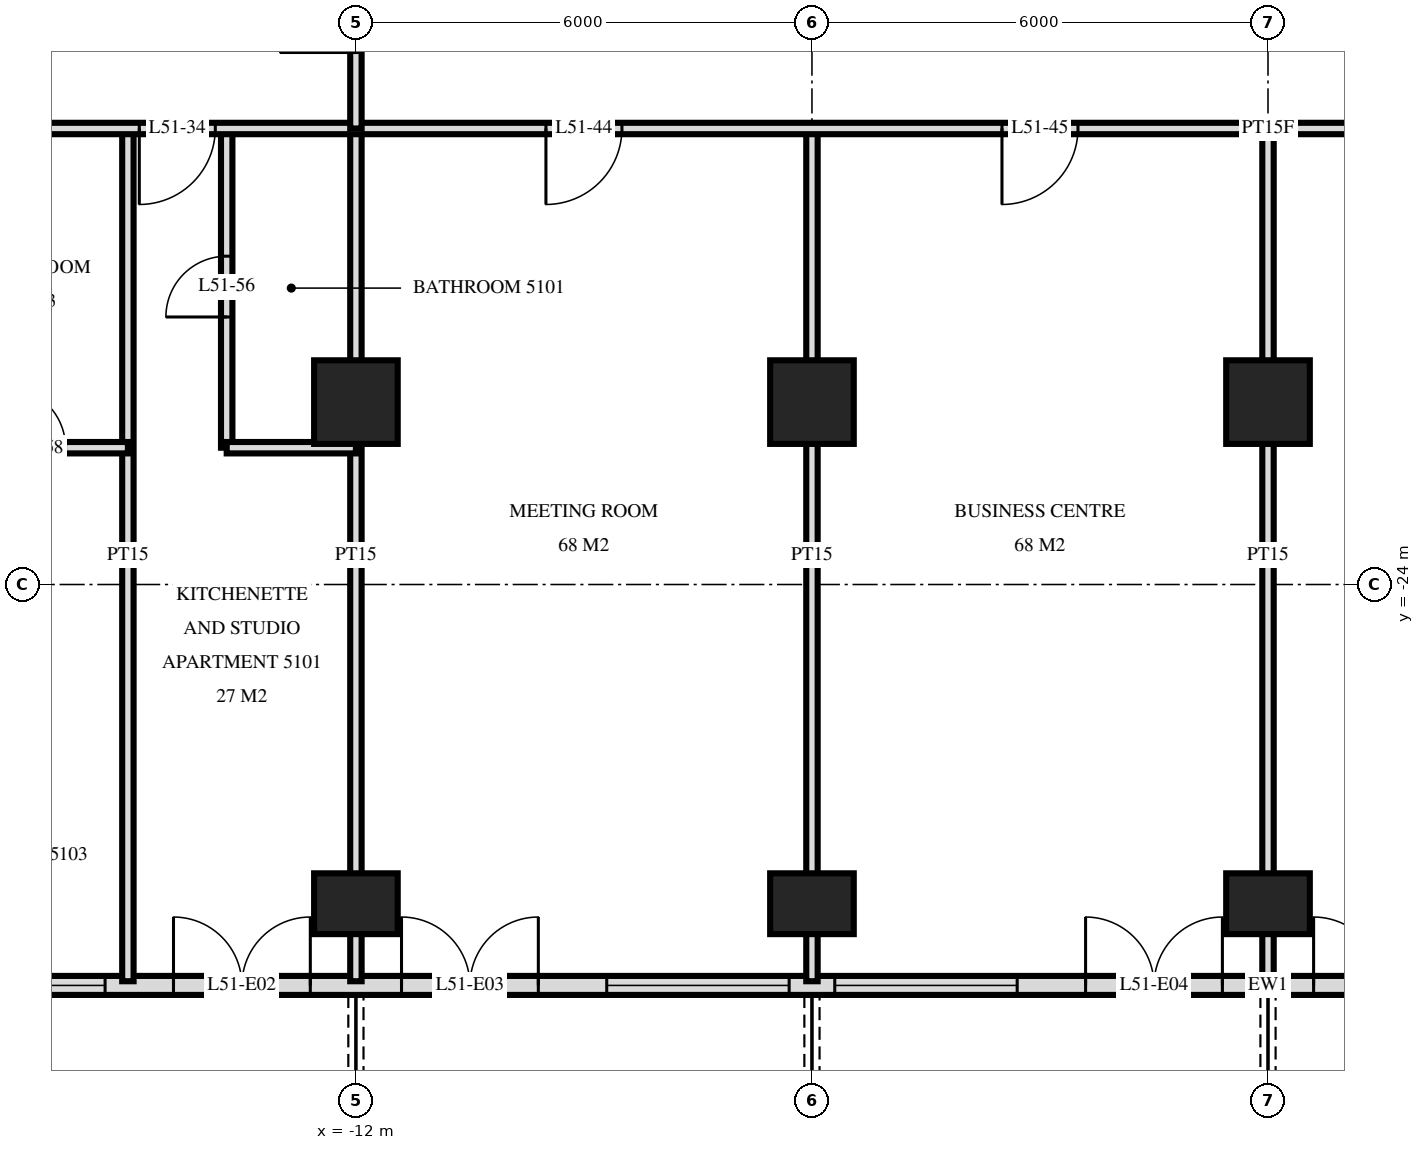
"""IFC4 building model, lengths in metres.
Left out: names, types, materials, properties, quantities, classifications, styles, units other than length and angle.
Written with IfcOpenShell. Run it as: python <this file> out.ifc"""

import sys

from ifc_helpers import new_model, si_unit, direction, frame, frame_2d, origin, origin_2d, place, context, subcontext, project, spatial, rectangle, extrude, element, fill, save


model = new_model("IFC4")
c1 = context("Model", 3, precision=1e-05, world=origin(), true_north=direction((0.0, 1.0)))
c2 = subcontext(c1, "Body", "Model", "MODEL_VIEW")
j1 = project(units=[si_unit("LENGTHUNIT", "METRE"), si_unit("PLANEANGLEUNIT", "RADIAN")], contexts=[c1])
p1 = place(None, origin())
s1 = spatial("IfcSite", under=j1, at=p1, CompositionType="ELEMENT")
p2 = place(p1, origin())
s2 = spatial("IfcBuilding", under=s1, at=p2, CompositionType="ELEMENT")
p3 = place(p2, frame((0.0, 0.0, 197.6)))
s3 = spatial("IfcBuildingStorey", under=s2, at=p3, CompositionType="ELEMENT", Elevation=197.6)
p4 = place(p3, frame((-12.0, -28.2, 0.0), z_axis=(0.0, 0.0, 1.0), x_axis=(1.0, 0.0, 0.0)))
e1 = element("IfcColumn", 1, at=p4, inside=s3, PredefinedType="COLUMN", context=c2, shape_type="SweptSolid", body=[
    extrude(rectangle(XDim=1.1, YDim=0.8, at=origin_2d()), origin(), (0.0, 0.0, 1.0), 3.5),
])
p5 = place(p3, frame((-12.0, -21.6, 0.0), z_axis=(0.0, 0.0, 1.0), x_axis=(1.0, 0.0, 0.0)))
e2 = element("IfcColumn", 2, at=p5, inside=s3, PredefinedType="COLUMN", context=c2, shape_type="SweptSolid", body=[
    extrude(rectangle(XDim=1.1, YDim=1.1, at=origin_2d()), origin(), (0.0, 0.0, 1.0), 3.5),
])
p6 = place(p3, frame((-6.0, -28.2, 0.0), z_axis=(0.0, 0.0, 1.0), x_axis=(1.0, 0.0, 0.0)))
e3 = element("IfcColumn", 3, at=p6, inside=s3, PredefinedType="COLUMN", context=c2, shape_type="SweptSolid", body=[
    extrude(rectangle(XDim=1.1, YDim=0.8, at=origin_2d()), origin(), (0.0, 0.0, 1.0), 3.5),
])
p7 = place(p3, frame((-6.0, -21.6, 0.0), z_axis=(0.0, 0.0, 1.0), x_axis=(1.0, 0.0, 0.0)))
e4 = element("IfcColumn", 4, at=p7, inside=s3, PredefinedType="COLUMN", context=c2, shape_type="SweptSolid", body=[
    extrude(rectangle(XDim=1.1, YDim=1.1, at=origin_2d()), origin(), (0.0, 0.0, 1.0), 3.5),
])
p8 = place(p3, frame((0.0, -28.2, 0.0), z_axis=(0.0, 0.0, 1.0), x_axis=(1.0, 0.0, 0.0)))
e5 = element("IfcColumn", 5, at=p8, inside=s3, PredefinedType="COLUMN", context=c2, shape_type="SweptSolid", body=[
    extrude(rectangle(XDim=1.1, YDim=0.8, at=origin_2d()), origin(), (0.0, 0.0, 1.0), 3.5),
])
p9 = place(p3, frame((0.0, -21.6, 0.0), z_axis=(0.0, 0.0, 1.0), x_axis=(1.0, 0.0, 0.0)))
e6 = element("IfcColumn", 6, at=p9, inside=s3, PredefinedType="COLUMN", context=c2, shape_type="SweptSolid", body=[
    extrude(rectangle(XDim=1.1, YDim=1.1, at=origin_2d()), origin(), (0.0, 0.0, 1.0), 3.5),
])
p10 = place(p3, frame((-22.475, -29.275, 0.0), z_axis=(0.0, 0.0, 1.0), x_axis=(1.0, 0.0, 0.0)))
e7 = element("IfcWall", 7, at=p10, inside=s3, PredefinedType="SOLIDWALL", context=c2, shape_type="SweptSolid", body=[
    extrude(rectangle(XDim=44.951, YDim=0.25, at=frame_2d((22.475, 0.0))), origin(), (0.0, 0.0, 1.0), 3.22),
])
p11 = place(p10, frame((0.575, 0.0, 0.0)))
e8 = element("IfcOpeningElement", 8, at=p11, cuts=e7, PredefinedType="OPENING", context=c2, shape_type="SweptSolid", body=[
    extrude(rectangle(XDim=1.8, YDim=2.4, at=frame_2d((0.9, 1.2))), frame((0.0, 0.135, 0.0), z_axis=(0.0, -1.0, 0.0), x_axis=(1.0, 0.0, 0.0)), (0.0, 0.0, 1.0), 0.27),
])
p12 = place(p10, frame((4.775, 0.0, 0.9)))
e9 = element("IfcOpeningElement", 9, at=p12, cuts=e7, PredefinedType="OPENING", context=c2, shape_type="SweptSolid", body=[
    extrude(rectangle(XDim=2.4, YDim=1.5, at=frame_2d((1.2, 0.75))), frame((0.0, 0.135, 0.0), z_axis=(0.0, -1.0, 0.0), x_axis=(1.0, 0.0, 0.0)), (0.0, 0.0, 1.0), 0.27),
])
p13 = place(p10, frame((8.075, 0.0, 0.0)))
e10 = element("IfcOpeningElement", 10, at=p13, cuts=e7, PredefinedType="OPENING", context=c2, shape_type="SweptSolid", body=[
    extrude(rectangle(XDim=1.8, YDim=2.4, at=frame_2d((0.9, 1.2))), frame((0.0, 0.135, 0.0), z_axis=(0.0, -1.0, 0.0), x_axis=(1.0, 0.0, 0.0)), (0.0, 0.0, 1.0), 0.27),
])
p14 = place(p10, frame((11.075, 0.0, 0.0)))
e11 = element("IfcOpeningElement", 11, at=p14, cuts=e7, PredefinedType="OPENING", context=c2, shape_type="SweptSolid", body=[
    extrude(rectangle(XDim=1.8, YDim=2.4, at=frame_2d((0.9, 1.2))), frame((0.0, 0.135, 0.0), z_axis=(0.0, -1.0, 0.0), x_axis=(1.0, 0.0, 0.0)), (0.0, 0.0, 1.0), 0.27),
])
p15 = place(p10, frame((13.775, 0.0, 0.9)))
e12 = element("IfcOpeningElement", 12, at=p15, cuts=e7, PredefinedType="OPENING", context=c2, shape_type="SweptSolid", body=[
    extrude(rectangle(XDim=2.4, YDim=1.5, at=frame_2d((1.2, 0.75))), frame((0.0, 0.135, 0.0), z_axis=(0.0, -1.0, 0.0), x_axis=(1.0, 0.0, 0.0)), (0.0, 0.0, 1.0), 0.27),
])
p16 = place(p10, frame((16.775, 0.0, 0.9)))
e13 = element("IfcOpeningElement", 13, at=p16, cuts=e7, PredefinedType="OPENING", context=c2, shape_type="SweptSolid", body=[
    extrude(rectangle(XDim=2.4, YDim=1.5, at=frame_2d((1.2, 0.75))), frame((0.0, 0.135, 0.0), z_axis=(0.0, -1.0, 0.0), x_axis=(1.0, 0.0, 0.0)), (0.0, 0.0, 1.0), 0.27),
])
p17 = place(p10, frame((20.075, 0.0, 0.0)))
e14 = element("IfcOpeningElement", 14, at=p17, cuts=e7, PredefinedType="OPENING", context=c2, shape_type="SweptSolid", body=[
    extrude(rectangle(XDim=1.8, YDim=2.4, at=frame_2d((0.9, 1.2))), frame((0.0, 0.135, 0.0), z_axis=(0.0, -1.0, 0.0), x_axis=(1.0, 0.0, 0.0)), (0.0, 0.0, 1.0), 0.27),
])
p18 = place(p10, frame((23.075, 0.0, 0.0)))
e15 = element("IfcOpeningElement", 15, at=p18, cuts=e7, PredefinedType="OPENING", context=c2, shape_type="SweptSolid", body=[
    extrude(rectangle(XDim=1.8, YDim=2.4, at=frame_2d((0.9, 1.2))), frame((0.0, 0.135, 0.0), z_axis=(0.0, -1.0, 0.0), x_axis=(1.0, 0.0, 0.0)), (0.0, 0.0, 1.0), 0.27),
])
p19 = place(p10, frame((25.775, 0.0, 0.9)))
e16 = element("IfcOpeningElement", 16, at=p19, cuts=e7, PredefinedType="OPENING", context=c2, shape_type="SweptSolid", body=[
    extrude(rectangle(XDim=2.4, YDim=1.5, at=frame_2d((1.2, 0.75))), frame((0.0, 0.135, 0.0), z_axis=(0.0, -1.0, 0.0), x_axis=(1.0, 0.0, 0.0)), (0.0, 0.0, 1.0), 0.27),
])
p20 = place(p10, frame((29.075, 0.0, 0.0)))
e17 = element("IfcOpeningElement", 17, at=p20, cuts=e7, PredefinedType="OPENING", context=c2, shape_type="SweptSolid", body=[
    extrude(rectangle(XDim=1.8, YDim=2.4, at=frame_2d((0.9, 1.2))), frame((0.0, 0.135, 0.0), z_axis=(0.0, -1.0, 0.0), x_axis=(1.0, 0.0, 0.0)), (0.0, 0.0, 1.0), 0.27),
])
p21 = place(p10, frame((31.775, 0.0, 0.9)))
e18 = element("IfcOpeningElement", 18, at=p21, cuts=e7, PredefinedType="OPENING", context=c2, shape_type="SweptSolid", body=[
    extrude(rectangle(XDim=2.4, YDim=1.5, at=frame_2d((1.2, 0.75))), frame((0.0, 0.135, 0.0), z_axis=(0.0, -1.0, 0.0), x_axis=(1.0, 0.0, 0.0)), (0.0, 0.0, 1.0), 0.27),
])
p22 = place(p10, frame((35.075, 0.0, 0.0)))
e19 = element("IfcOpeningElement", 19, at=p22, cuts=e7, PredefinedType="OPENING", context=c2, shape_type="SweptSolid", body=[
    extrude(rectangle(XDim=1.8, YDim=2.4, at=frame_2d((0.9, 1.2))), frame((0.0, 0.135, 0.0), z_axis=(0.0, -1.0, 0.0), x_axis=(1.0, 0.0, 0.0)), (0.0, 0.0, 1.0), 0.27),
])
p23 = place(p10, frame((37.775, 0.0, 0.9)))
e20 = element("IfcOpeningElement", 20, at=p23, cuts=e7, PredefinedType="OPENING", context=c2, shape_type="SweptSolid", body=[
    extrude(rectangle(XDim=2.4, YDim=1.5, at=frame_2d((1.2, 0.75))), frame((0.0, 0.135, 0.0), z_axis=(0.0, -1.0, 0.0), x_axis=(1.0, 0.0, 0.0)), (0.0, 0.0, 1.0), 0.27),
])
p24 = place(p10, frame((41.075, 0.0, 0.0)))
e21 = element("IfcOpeningElement", 21, at=p24, cuts=e7, PredefinedType="OPENING", context=c2, shape_type="SweptSolid", body=[
    extrude(rectangle(XDim=1.8, YDim=2.4, at=frame_2d((0.9, 1.2))), frame((0.0, 0.135, 0.0), z_axis=(0.0, -1.0, 0.0), x_axis=(1.0, 0.0, 0.0)), (0.0, 0.0, 1.0), 0.27),
])
for number, where, z_axis, x_axis in (
    (22, (0.0, -29.22, 0.0), (0.0, 0.0, 1.0), (0.0, 1.0, 0.0)),
    (23, (-6.0, -29.22, 0.0), (0.0, 0.0, 1.0), (0.0, 1.0, 0.0)),
):
    element("IfcWall", number, at=place(p3, frame(where, z_axis=z_axis, x_axis=x_axis)), inside=s3, PredefinedType="PARTITIONING", context=c2, shape_type="SweptSolid", body=[
        extrude(rectangle(XDim=11.22, YDim=0.15, at=frame_2d((5.61, 0.0))), origin(), (0.0, 0.0, 1.0), 3.22),
    ])
p25 = place(p3, frame((-12.0, -18.0, 0.0), z_axis=(0.0, 0.0, 1.0), x_axis=(0.0, 1.0, 0.0)))
e24 = element("IfcWall", 24, at=p25, inside=s3, PredefinedType="PARTITIONING", context=c2, shape_type="SweptSolid", body=[
    extrude(rectangle(XDim=2.95, YDim=0.15, at=frame_2d((1.475, 0.0))), origin(), (0.0, 0.0, 1.0), 3.22),
])
p26 = place(p25, frame((1.0, 0.0, 0.0)))
e25 = element("IfcOpeningElement", 25, at=p26, cuts=e24, PredefinedType="OPENING", context=c2, shape_type="SweptSolid", body=[
    extrude(rectangle(XDim=1.0, YDim=2.1, at=frame_2d((0.5, 1.05))), frame((0.0, 0.085, 0.0), z_axis=(0.0, -1.0, 0.0), x_axis=(1.0, 0.0, 0.0)), (0.0, 0.0, 1.0), 0.17),
])
p27 = place(p3, frame((-12.0, -29.22, 0.0), z_axis=(0.0, 0.0, 1.0), x_axis=(0.0, 1.0, 0.0)))
e26 = element("IfcWall", 26, at=p27, inside=s3, PredefinedType="PARTITIONING", context=c2, shape_type="SweptSolid", body=[
    extrude(rectangle(XDim=11.22, YDim=0.15, at=frame_2d((5.61, 0.0))), origin(), (0.0, 0.0, 1.0), 3.22),
])
p28 = place(p3, frame((-13.7, -22.2, 0.0), z_axis=(0.0, 0.0, 1.0), x_axis=(0.0, 1.0, 0.0)))
e27 = element("IfcWall", 27, at=p28, inside=s3, PredefinedType="PARTITIONING", context=c2, shape_type="SweptSolid", body=[
    extrude(rectangle(XDim=4.2, YDim=0.15, at=frame_2d((2.1, 0.0))), origin(), (0.0, 0.0, 1.0), 3.22),
])
p29 = place(p28, frame((1.72, 0.0, 0.0)))
e28 = element("IfcOpeningElement", 28, at=p29, cuts=e27, PredefinedType="OPENING", context=c2, shape_type="SweptSolid", body=[
    extrude(rectangle(XDim=0.8, YDim=2.1, at=frame_2d((0.4, 1.05))), frame((0.0, 0.085, 0.0), z_axis=(0.0, -1.0, 0.0), x_axis=(1.0, 0.0, 0.0)), (0.0, 0.0, 1.0), 0.17),
])
p30 = place(p3, frame((-15.0, -29.22, 0.0), z_axis=(0.0, 0.0, 1.0), x_axis=(0.0, 1.0, 0.0)))
e29 = element("IfcWall", 29, at=p30, inside=s3, PredefinedType="PARTITIONING", context=c2, shape_type="SweptSolid", body=[
    extrude(rectangle(XDim=11.22, YDim=0.15, at=frame_2d((5.61, 0.0))), origin(), (0.0, 0.0, 1.0), 3.22),
])
p31 = place(p3, frame((-21.4, -22.2, 0.0), z_axis=(0.0, 0.0, 1.0), x_axis=(1.0, 0.0, 0.0)))
e30 = element("IfcWall", 30, at=p31, inside=s3, PredefinedType="PARTITIONING", context=c2, shape_type="SweptSolid", body=[
    extrude(rectangle(XDim=6.4, YDim=0.15, at=frame_2d((3.2, 0.0))), origin(), (0.0, 0.0, 1.0), 3.22),
])
p32 = place(p31, frame((4.78, 0.0, 0.0)))
e31 = element("IfcOpeningElement", 31, at=p32, cuts=e30, PredefinedType="OPENING", context=c2, shape_type="SweptSolid", body=[
    extrude(rectangle(XDim=0.8, YDim=2.1, at=frame_2d((0.4, 1.05))), frame((0.0, 0.085, 0.0), z_axis=(0.0, -1.0, 0.0), x_axis=(1.0, 0.0, 0.0)), (0.0, 0.0, 1.0), 0.17),
])
p33 = place(p31, frame((1.95, 0.0, 0.0)))
e32 = element("IfcOpeningElement", 32, at=p33, cuts=e30, PredefinedType="OPENING", context=c2, shape_type="SweptSolid", body=[
    extrude(rectangle(XDim=0.8, YDim=2.1, at=frame_2d((0.4, 1.05))), frame((0.0, 0.085, 0.0), z_axis=(0.0, -1.0, 0.0), x_axis=(1.0, 0.0, 0.0)), (0.0, 0.0, 1.0), 0.17),
])
p34 = place(p3, frame((-13.7, -22.2, 0.0), z_axis=(0.0, 0.0, 1.0), x_axis=(1.0, 0.0, 0.0)))
e33 = element("IfcWall", 33, at=p34, inside=s3, PredefinedType="PARTITIONING", context=c2, shape_type="SweptSolid", body=[
    extrude(rectangle(XDim=1.7, YDim=0.15, at=frame_2d((0.85, 0.0))), origin(), (0.0, 0.0, 1.0), 3.22),
])
p35 = place(p3, frame((-26.82, -18.0, 0.0), z_axis=(0.0, 0.0, 1.0), x_axis=(1.0, 0.0, 0.0)))
e34 = element("IfcWall", 34, at=p35, inside=s3, PredefinedType="PARTITIONING", context=c2, shape_type="SweptSolid", body=[
    extrude(rectangle(XDim=53.64, YDim=0.15, at=frame_2d((26.82, 0.0))), origin(), (0.0, 0.0, 1.0), 3.22),
])
p36 = place(p35, frame((11.97, 0.0, 0.0)))
e35 = element("IfcOpeningElement", 35, at=p36, cuts=e34, PredefinedType="OPENING", context=c2, shape_type="SweptSolid", body=[
    extrude(rectangle(XDim=1.0, YDim=2.1, at=frame_2d((0.5, 1.05))), frame((0.0, 0.085, 0.0), z_axis=(0.0, -1.0, 0.0), x_axis=(1.0, 0.0, 0.0)), (0.0, 0.0, 1.0), 0.17),
])
p37 = place(p35, frame((3.92, 0.0, 0.0)))
e36 = element("IfcOpeningElement", 36, at=p37, cuts=e34, PredefinedType="OPENING", context=c2, shape_type="SweptSolid", body=[
    extrude(rectangle(XDim=1.0, YDim=2.1, at=frame_2d((0.5, 1.05))), frame((0.0, 0.085, 0.0), z_axis=(0.0, -1.0, 0.0), x_axis=(1.0, 0.0, 0.0)), (0.0, 0.0, 1.0), 0.17),
])
p38 = place(p35, frame((5.72, 0.0, 0.0)))
e37 = element("IfcOpeningElement", 37, at=p38, cuts=e34, PredefinedType="OPENING", context=c2, shape_type="SweptSolid", body=[
    extrude(rectangle(XDim=1.0, YDim=2.1, at=frame_2d((0.5, 1.05))), frame((0.0, 0.085, 0.0), z_axis=(0.0, -1.0, 0.0), x_axis=(1.0, 0.0, 0.0)), (0.0, 0.0, 1.0), 0.17),
])
p39 = place(p35, frame((40.67, 0.0, 0.0)))
e38 = element("IfcOpeningElement", 38, at=p39, cuts=e34, PredefinedType="OPENING", context=c2, shape_type="SweptSolid", body=[
    extrude(rectangle(XDim=1.0, YDim=2.1, at=frame_2d((0.5, 1.05))), frame((0.0, 0.085, 0.0), z_axis=(0.0, -1.0, 0.0), x_axis=(1.0, 0.0, 0.0)), (0.0, 0.0, 1.0), 0.17),
])
p40 = place(p35, frame((48.72, 0.0, 0.0)))
e39 = element("IfcOpeningElement", 39, at=p40, cuts=e34, PredefinedType="OPENING", context=c2, shape_type="SweptSolid", body=[
    extrude(rectangle(XDim=1.0, YDim=2.1, at=frame_2d((0.5, 1.05))), frame((0.0, 0.085, 0.0), z_axis=(0.0, -1.0, 0.0), x_axis=(1.0, 0.0, 0.0)), (0.0, 0.0, 1.0), 0.17),
])
p41 = place(p35, frame((46.92, 0.0, 0.0)))
e40 = element("IfcOpeningElement", 40, at=p41, cuts=e34, PredefinedType="OPENING", context=c2, shape_type="SweptSolid", body=[
    extrude(rectangle(XDim=1.0, YDim=2.1, at=frame_2d((0.5, 1.05))), frame((0.0, 0.085, 0.0), z_axis=(0.0, -1.0, 0.0), x_axis=(1.0, 0.0, 0.0)), (0.0, 0.0, 1.0), 0.17),
])
p42 = place(p35, frame((17.32, 0.0, 0.0)))
e41 = element("IfcOpeningElement", 41, at=p42, cuts=e34, PredefinedType="OPENING", context=c2, shape_type="SweptSolid", body=[
    extrude(rectangle(XDim=1.0, YDim=2.1, at=frame_2d((0.5, 1.05))), frame((0.0, 0.085, 0.0), z_axis=(0.0, -1.0, 0.0), x_axis=(1.0, 0.0, 0.0)), (0.0, 0.0, 1.0), 0.17),
])
p43 = place(p35, frame((23.32, 0.0, 0.0)))
e42 = element("IfcOpeningElement", 42, at=p43, cuts=e34, PredefinedType="OPENING", context=c2, shape_type="SweptSolid", body=[
    extrude(rectangle(XDim=1.0, YDim=2.1, at=frame_2d((0.5, 1.05))), frame((0.0, 0.085, 0.0), z_axis=(0.0, -1.0, 0.0), x_axis=(1.0, 0.0, 0.0)), (0.0, 0.0, 1.0), 0.17),
])
p44 = place(p35, frame((29.32, 0.0, 0.0)))
e43 = element("IfcOpeningElement", 43, at=p44, cuts=e34, PredefinedType="OPENING", context=c2, shape_type="SweptSolid", body=[
    extrude(rectangle(XDim=1.0, YDim=2.1, at=frame_2d((0.5, 1.05))), frame((0.0, 0.085, 0.0), z_axis=(0.0, -1.0, 0.0), x_axis=(1.0, 0.0, 0.0)), (0.0, 0.0, 1.0), 0.17),
])
p45 = place(p35, frame((35.32, 0.0, 0.0)))
e44 = element("IfcOpeningElement", 44, at=p45, cuts=e34, PredefinedType="OPENING", context=c2, shape_type="SweptSolid", body=[
    extrude(rectangle(XDim=1.0, YDim=2.1, at=frame_2d((0.5, 1.05))), frame((0.0, 0.085, 0.0), z_axis=(0.0, -1.0, 0.0), x_axis=(1.0, 0.0, 0.0)), (0.0, 0.0, 1.0), 0.17),
])
p46 = place(p12, origin())
e45 = element("IfcWindow", 45, at=p46, inside=s3, PartitioningType="SINGLE_PANEL", PredefinedType="WINDOW", context=c2, shape_type="SweptSolid", body=[
    extrude(rectangle(XDim=2.4, YDim=1.5, at=frame_2d((1.2, 0.75))), frame((0.0, 0.03, 0.0), z_axis=(0.0, -1.0, 0.0), x_axis=(1.0, 0.0, 0.0)), (0.0, 0.0, 1.0), 0.06),
])
fill(e9, e45)
p47 = place(p13, origin())
e46 = element("IfcDoor", 46, at=p47, inside=s3, OperationType="DOUBLE_DOOR_SINGLE_SWING", PredefinedType="DOOR", context=c2, shape_type="SweptSolid", body=[
    extrude(rectangle(XDim=1.8, YDim=2.4, at=frame_2d((0.9, 1.2))), frame((0.0, 0.025, 0.0), z_axis=(0.0, -1.0, 0.0), x_axis=(1.0, 0.0, 0.0)), (0.0, 0.0, 1.0), 0.05),
])
fill(e10, e46)
p48 = place(p14, origin())
e47 = element("IfcDoor", 47, at=p48, inside=s3, OperationType="DOUBLE_DOOR_SINGLE_SWING", PredefinedType="DOOR", context=c2, shape_type="SweptSolid", body=[
    extrude(rectangle(XDim=1.8, YDim=2.4, at=frame_2d((0.9, 1.2))), frame((0.0, 0.025, 0.0), z_axis=(0.0, -1.0, 0.0), x_axis=(1.0, 0.0, 0.0)), (0.0, 0.0, 1.0), 0.05),
])
fill(e11, e47)
p49 = place(p15, origin())
e48 = element("IfcWindow", 48, at=p49, inside=s3, PartitioningType="SINGLE_PANEL", PredefinedType="WINDOW", context=c2, shape_type="SweptSolid", body=[
    extrude(rectangle(XDim=2.4, YDim=1.5, at=frame_2d((1.2, 0.75))), frame((0.0, 0.03, 0.0), z_axis=(0.0, -1.0, 0.0), x_axis=(1.0, 0.0, 0.0)), (0.0, 0.0, 1.0), 0.06),
])
fill(e12, e48)
p50 = place(p16, origin())
e49 = element("IfcWindow", 49, at=p50, inside=s3, PartitioningType="SINGLE_PANEL", PredefinedType="WINDOW", context=c2, shape_type="SweptSolid", body=[
    extrude(rectangle(XDim=2.4, YDim=1.5, at=frame_2d((1.2, 0.75))), frame((0.0, 0.03, 0.0), z_axis=(0.0, -1.0, 0.0), x_axis=(1.0, 0.0, 0.0)), (0.0, 0.0, 1.0), 0.06),
])
fill(e13, e49)
p51 = place(p17, origin())
e50 = element("IfcDoor", 50, at=p51, inside=s3, OperationType="DOUBLE_DOOR_SINGLE_SWING", PredefinedType="DOOR", context=c2, shape_type="SweptSolid", body=[
    extrude(rectangle(XDim=1.8, YDim=2.4, at=frame_2d((0.9, 1.2))), frame((0.0, 0.025, 0.0), z_axis=(0.0, -1.0, 0.0), x_axis=(1.0, 0.0, 0.0)), (0.0, 0.0, 1.0), 0.05),
])
fill(e14, e50)
p52 = place(p18, origin())
e51 = element("IfcDoor", 51, at=p52, inside=s3, OperationType="DOUBLE_DOOR_SINGLE_SWING", PredefinedType="DOOR", context=c2, shape_type="SweptSolid", body=[
    extrude(rectangle(XDim=1.8, YDim=2.4, at=frame_2d((0.9, 1.2))), frame((0.0, 0.025, 0.0), z_axis=(0.0, -1.0, 0.0), x_axis=(1.0, 0.0, 0.0)), (0.0, 0.0, 1.0), 0.05),
])
fill(e15, e51)
p53 = place(p36, frame((0.5, 0.0, 0.0), z_axis=(0.0, 0.0, 1.0), x_axis=(-1.0, 0.0, 0.0)))
e52 = element("IfcDoor", 52, at=p53, inside=s3, OperationType="SINGLE_SWING_LEFT", PredefinedType="DOOR", context=c2, shape_type="SweptSolid", body=[
    extrude(rectangle(XDim=1.0, YDim=2.1, at=frame_2d((0.0, 1.05))), frame((0.0, -0.025, 0.0), z_axis=(0.0, 1.0, 0.0), x_axis=(-1.0, 0.0, 0.0)), (0.0, 0.0, 1.0), 0.05),
])
fill(e35, e52)
p54 = place(p42, frame((0.5, 0.0, 0.0), z_axis=(0.0, 0.0, 1.0), x_axis=(-1.0, 0.0, 0.0)))
e53 = element("IfcDoor", 53, at=p54, inside=s3, OperationType="SINGLE_SWING_LEFT", PredefinedType="DOOR", context=c2, shape_type="SweptSolid", body=[
    extrude(rectangle(XDim=1.0, YDim=2.1, at=frame_2d((0.0, 1.05))), frame((0.0, -0.025, 0.0), z_axis=(0.0, 1.0, 0.0), x_axis=(-1.0, 0.0, 0.0)), (0.0, 0.0, 1.0), 0.05),
])
fill(e41, e53)
p55 = place(p43, frame((0.5, 0.0, 0.0), z_axis=(0.0, 0.0, 1.0), x_axis=(-1.0, 0.0, 0.0)))
e54 = element("IfcDoor", 54, at=p55, inside=s3, OperationType="SINGLE_SWING_LEFT", PredefinedType="DOOR", context=c2, shape_type="SweptSolid", body=[
    extrude(rectangle(XDim=1.0, YDim=2.1, at=frame_2d((0.0, 1.05))), frame((0.0, -0.025, 0.0), z_axis=(0.0, 1.0, 0.0), x_axis=(-1.0, 0.0, 0.0)), (0.0, 0.0, 1.0), 0.05),
])
fill(e42, e54)
p56 = place(p29, origin())
e55 = element("IfcDoor", 55, at=p56, inside=s3, OperationType="SINGLE_SWING_RIGHT", PredefinedType="DOOR", context=c2, shape_type="SweptSolid", body=[
    extrude(rectangle(XDim=0.8, YDim=2.1, at=frame_2d((0.4, 1.05))), frame((0.0, 0.025, 0.0), z_axis=(0.0, -1.0, 0.0), x_axis=(1.0, 0.0, 0.0)), (0.0, 0.0, 1.0), 0.05),
])
fill(e28, e55)
p57 = place(p32, origin())
e56 = element("IfcDoor", 56, at=p57, inside=s3, OperationType="SINGLE_SWING_RIGHT", PredefinedType="DOOR", context=c2, shape_type="SweptSolid", body=[
    extrude(rectangle(XDim=0.8, YDim=2.1, at=frame_2d((0.4, 1.05))), frame((0.0, 0.025, 0.0), z_axis=(0.0, -1.0, 0.0), x_axis=(1.0, 0.0, 0.0)), (0.0, 0.0, 1.0), 0.05),
])
fill(e31, e56)
save(model, sys.argv[1])
